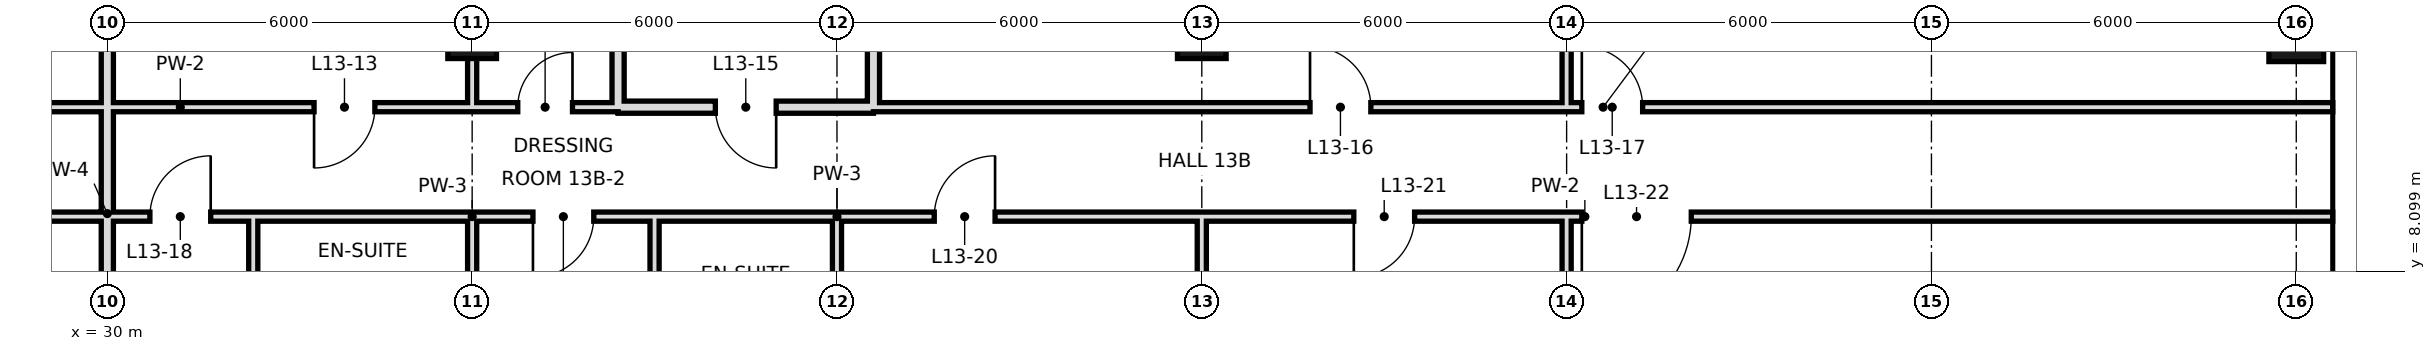
"""IFC4 building model, lengths in metres.
Left out: names, types, materials, properties, quantities, classifications, styles, units other than length and angle.
Written with IfcOpenShell. Run it as: python <this file> out.ifc"""

import sys

from ifc_helpers import new_model, si_unit, direction, frame, frame_2d, origin, origin_2d, place, context, subcontext, project, spatial, rectangle, hollow_rectangle, extrude, element, fill, save


model = new_model("IFC4")
c1 = context("Model", 3, precision=1e-05, world=origin(), true_north=direction((0.0, 1.0)))
c2 = subcontext(c1, "Body", "Model", "MODEL_VIEW")
j1 = project(units=[si_unit("LENGTHUNIT", "METRE"), si_unit("PLANEANGLEUNIT", "RADIAN")], contexts=[c1])
p1 = place(None, origin())
s1 = spatial("IfcSite", under=j1, at=p1, CompositionType="ELEMENT")
p2 = place(p1, origin())
s2 = spatial("IfcBuilding", under=s1, at=p2, CompositionType="ELEMENT")
p3 = place(p2, frame((0.0, 0.0, 67.8)))
s3 = spatial("IfcBuildingStorey", under=s2, at=p3, CompositionType="ELEMENT", Elevation=67.8)
for number, where, z_axis, x_axis in (
    (1, (36.0, 12.0, 0.0), (0.0, 0.0, 1.0), (1.0, 0.0, 0.0)),
    (2, (48.0, 12.0, 0.0), (0.0, 0.0, 1.0), (1.0, 0.0, 0.0)),
):
    element("IfcColumn", number, at=place(p3, frame(where, z_axis=z_axis, x_axis=x_axis)), inside=s3, PredefinedType="COLUMN", context=c2, shape_type="SweptSolid", body=[
        extrude(hollow_rectangle(XDim=0.8, YDim=0.8, WallThickness=0.04, at=origin_2d()), origin(), (0.0, 0.0, 1.0), 3.6),
    ])
p4 = place(p3, frame((66.0, 12.0, 0.0), z_axis=(0.0, 0.0, 1.0), x_axis=(1.0, 0.0, 0.0)))
e3 = element("IfcColumn", 3, at=p4, inside=s3, PredefinedType="COLUMN", context=c2, shape_type="SweptSolid", body=[
    extrude(hollow_rectangle(XDim=0.9, YDim=0.9, WallThickness=0.045, at=origin_2d()), origin(), (0.0, 0.0, 1.0), 3.6),
])
p5 = place(p3, frame((30.0, -0.6, 0.0), z_axis=(0.0, 0.0, 1.0), x_axis=(0.0, 1.0, 0.0)))
e4 = element("IfcWall", 4, at=p5, inside=s3, PredefinedType="SOLIDWALL", context=c2, shape_type="SweptSolid", body=[
    extrude(rectangle(XDim=19.3, YDim=0.2, at=frame_2d((9.65, 0.0))), origin(), (0.0, 0.0, 1.0), 2.72),
])
p6 = place(p3, frame((32.4, 6.0, 0.0), z_axis=(0.0, 0.0, 1.0), x_axis=(0.0, 1.0, 0.0)))
e5 = element("IfcWall", 5, at=p6, inside=s3, PredefinedType="PARTITIONING", context=c2, shape_type="SweptSolid", body=[
    extrude(rectangle(XDim=3.0, YDim=0.15, at=frame_2d((1.5, 0.0))), origin(), (0.0, 0.0, 1.0), 3.42),
])
p7 = place(p3, frame((36.0, 6.0, 0.0), z_axis=(0.0, 0.0, 1.0), x_axis=(0.0, 1.0, 0.0)))
e6 = element("IfcWall", 6, at=p7, inside=s3, PredefinedType="PARTITIONING", context=c2, shape_type="SweptSolid", body=[
    extrude(rectangle(XDim=3.0, YDim=0.15, at=frame_2d((1.5, 0.0))), origin(), (0.0, 0.0, 1.0), 2.72),
])
p8 = place(p3, frame((36.0, 10.8, 0.0), z_axis=(0.0, 0.0, 1.0), x_axis=(0.0, 1.0, 0.0)))
e7 = element("IfcWall", 7, at=p8, inside=s3, PredefinedType="PARTITIONING", context=c2, shape_type="SweptSolid", body=[
    extrude(rectangle(XDim=7.9, YDim=0.15, at=frame_2d((3.95, 0.0))), origin(), (0.0, 0.0, 1.0), 2.72),
])
p9 = place(p3, frame((38.4, 10.8, 0.0), z_axis=(0.0, 0.0, 1.0), x_axis=(0.0, 1.0, 0.0)))
e8 = element("IfcWall", 8, at=p9, inside=s3, PredefinedType="SOLIDWALL", context=c2, shape_type="SweptSolid", body=[
    extrude(rectangle(XDim=7.9, YDim=0.2, at=frame_2d((3.95, 0.0))), origin(), (0.0, 0.0, 1.0), 2.72),
])
p10 = place(p3, frame((39.0, 6.0, 0.0), z_axis=(0.0, 0.0, 1.0), x_axis=(0.0, 1.0, 0.0)))
e9 = element("IfcWall", 9, at=p10, inside=s3, PredefinedType="PARTITIONING", context=c2, shape_type="SweptSolid", body=[
    extrude(rectangle(XDim=3.0, YDim=0.15, at=frame_2d((1.5, 0.0))), origin(), (0.0, 0.0, 1.0), 3.42),
])
p11 = place(p3, frame((42.0, 6.0, 0.0), z_axis=(0.0, 0.0, 1.0), x_axis=(0.0, 1.0, 0.0)))
e10 = element("IfcWall", 10, at=p11, inside=s3, PredefinedType="PARTITIONING", context=c2, shape_type="SweptSolid", body=[
    extrude(rectangle(XDim=3.0, YDim=0.15, at=frame_2d((1.5, 0.0))), origin(), (0.0, 0.0, 1.0), 2.72),
])
p12 = place(p3, frame((42.6, 10.8, 0.0), z_axis=(0.0, 0.0, 1.0), x_axis=(0.0, 1.0, 0.0)))
e11 = element("IfcWall", 11, at=p12, inside=s3, PredefinedType="SOLIDWALL", context=c2, shape_type="SweptSolid", body=[
    extrude(rectangle(XDim=7.9, YDim=0.2, at=frame_2d((3.95, 0.0))), origin(), (0.0, 0.0, 1.0), 2.72),
])
p13 = place(p3, frame((48.0, 0.0, 0.0), z_axis=(0.0, 0.0, 1.0), x_axis=(0.0, 1.0, 0.0)))
e12 = element("IfcWall", 12, at=p13, inside=s3, PredefinedType="PARTITIONING", context=c2, shape_type="SweptSolid", body=[
    extrude(rectangle(XDim=9.0, YDim=0.15, at=frame_2d((4.5, 0.0))), origin(), (0.0, 0.0, 1.0), 2.72),
])
p14 = place(p3, frame((54.0, -0.6, 0.0), z_axis=(0.0, 0.0, 1.0), x_axis=(0.0, 1.0, 0.0)))
e13 = element("IfcWall", 13, at=p14, inside=s3, PredefinedType="PARTITIONING", context=c2, shape_type="SweptSolid", body=[
    extrude(rectangle(XDim=9.6, YDim=0.15, at=frame_2d((4.8, 0.0))), origin(), (0.0, 0.0, 1.0), 3.42),
])
p15 = place(p3, frame((54.0, 10.8, 0.0), z_axis=(0.0, 0.0, 1.0), x_axis=(0.0, 1.0, 0.0)))
e14 = element("IfcWall", 14, at=p15, inside=s3, PredefinedType="PARTITIONING", context=c2, shape_type="SweptSolid", body=[
    extrude(rectangle(XDim=7.2, YDim=0.15, at=frame_2d((3.6, 0.0))), origin(), (0.0, 0.0, 1.0), 3.42),
])
p16 = place(p3, frame((38.4, 10.8, 0.0), z_axis=(0.0, 0.0, 1.0), x_axis=(1.0, 0.0, 0.0)))
e15 = element("IfcWall", 15, at=p16, inside=s3, PredefinedType="SOLIDWALL", context=c2, shape_type="SweptSolid", body=[
    extrude(rectangle(XDim=4.2, YDim=0.2, at=frame_2d((2.1, 0.0))), origin(), (0.0, 0.0, 1.0), 2.72),
])
p17 = place(p16, frame((1.6, 0.0, 0.0)))
e16 = element("IfcOpeningElement", 16, at=p17, cuts=e15, PredefinedType="OPENING", context=c2, shape_type="SweptSolid", body=[
    extrude(rectangle(XDim=1.0, YDim=2.4, at=frame_2d((0.5, 1.2))), frame((0.0, 0.11, 0.0), z_axis=(0.0, -1.0, 0.0), x_axis=(1.0, 0.0, 0.0)), (0.0, 0.0, 1.0), 0.22),
])
p18 = place(p3, frame((26.4, 10.8, 0.0), z_axis=(0.0, 0.0, 1.0), x_axis=(1.0, 0.0, 0.0)))
e17 = element("IfcWall", 17, at=p18, inside=s3, PredefinedType="PARTITIONING", context=c2, shape_type="SweptSolid", body=[
    extrude(rectangle(XDim=9.6, YDim=0.15, at=frame_2d((4.8, 0.0))), origin(), (0.0, 0.0, 1.0), 3.42),
])
p19 = place(p18, frame((1.3, 0.0, 0.0)))
e18 = element("IfcOpeningElement", 18, at=p19, cuts=e17, PredefinedType="OPENING", context=c2, shape_type="SweptSolid", body=[
    extrude(rectangle(XDim=1.0, YDim=2.4, at=frame_2d((0.5, 1.2))), frame((0.0, 0.085, 0.0), z_axis=(0.0, -1.0, 0.0), x_axis=(1.0, 0.0, 0.0)), (0.0, 0.0, 1.0), 0.17),
])
p20 = place(p18, frame((7.0, 0.0, 0.0)))
e19 = element("IfcOpeningElement", 19, at=p20, cuts=e17, PredefinedType="OPENING", context=c2, shape_type="SweptSolid", body=[
    extrude(rectangle(XDim=1.0, YDim=2.4, at=frame_2d((0.5, 1.2))), frame((0.0, 0.085, 0.0), z_axis=(0.0, -1.0, 0.0), x_axis=(1.0, 0.0, 0.0)), (0.0, 0.0, 1.0), 0.17),
])
p21 = place(p3, frame((42.6, 10.8, 0.0), z_axis=(0.0, 0.0, 1.0), x_axis=(1.0, 0.0, 0.0)))
e20 = element("IfcWall", 20, at=p21, inside=s3, PredefinedType="PARTITIONING", context=c2, shape_type="SweptSolid", body=[
    extrude(rectangle(XDim=24.0, YDim=0.15, at=frame_2d((12.0, 0.0))), origin(), (0.0, 0.0, 1.0), 3.42),
])
p22 = place(p21, frame((7.18, 0.0, 0.0)))
e21 = element("IfcOpeningElement", 21, at=p22, cuts=e20, PredefinedType="OPENING", context=c2, shape_type="SweptSolid", body=[
    extrude(rectangle(XDim=1.0, YDim=2.4, at=frame_2d((0.5, 1.2))), frame((0.0, 0.085, 0.0), z_axis=(0.0, -1.0, 0.0), x_axis=(1.0, 0.0, 0.0)), (0.0, 0.0, 1.0), 0.17),
])
p23 = place(p21, frame((11.65, 0.0, 0.0)))
e22 = element("IfcOpeningElement", 22, at=p23, cuts=e20, PredefinedType="OPENING", context=c2, shape_type="SweptSolid", body=[
    extrude(rectangle(XDim=1.0, YDim=2.4, at=frame_2d((0.5, 1.2))), frame((0.0, 0.085, 0.0), z_axis=(0.0, -1.0, 0.0), x_axis=(1.0, 0.0, 0.0)), (0.0, 0.0, 1.0), 0.17),
])
p24 = place(p3, frame((36.0, 10.8, 0.0), z_axis=(0.0, 0.0, 1.0), x_axis=(1.0, 0.0, 0.0)))
e23 = element("IfcWall", 23, at=p24, inside=s3, PredefinedType="PARTITIONING", context=c2, shape_type="SweptSolid", body=[
    extrude(rectangle(XDim=2.4, YDim=0.15, at=frame_2d((1.2, 0.0))), origin(), (0.0, 0.0, 1.0), 3.42),
])
p25 = place(p24, frame((0.75, 0.0, 0.0)))
e24 = element("IfcOpeningElement", 24, at=p25, cuts=e23, PredefinedType="OPENING", context=c2, shape_type="SweptSolid", body=[
    extrude(rectangle(XDim=0.9, YDim=2.4, at=frame_2d((0.45, 1.2))), frame((0.0, 0.085, 0.0), z_axis=(0.0, -1.0, 0.0), x_axis=(1.0, 0.0, 0.0)), (0.0, 0.0, 1.0), 0.17),
])
p26 = place(p3, frame((30.0, 9.0, 0.0), z_axis=(0.0, 0.0, 1.0), x_axis=(1.0, 0.0, 0.0)))
e25 = element("IfcWall", 25, at=p26, inside=s3, PredefinedType="PARTITIONING", context=c2, shape_type="SweptSolid", body=[
    extrude(rectangle(XDim=2.4, YDim=0.15, at=frame_2d((1.2, 0.0))), origin(), (0.0, 0.0, 1.0), 3.42),
])
p27 = place(p26, frame((0.7, 0.0, 0.0)))
e26 = element("IfcOpeningElement", 26, at=p27, cuts=e25, PredefinedType="OPENING", context=c2, shape_type="SweptSolid", body=[
    extrude(rectangle(XDim=1.0, YDim=2.4, at=frame_2d((0.5, 1.2))), frame((0.0, 0.085, 0.0), z_axis=(0.0, -1.0, 0.0), x_axis=(1.0, 0.0, 0.0)), (0.0, 0.0, 1.0), 0.17),
])
p28 = place(p3, frame((36.0, 9.0, 0.0), z_axis=(0.0, 0.0, 1.0), x_axis=(1.0, 0.0, 0.0)))
e27 = element("IfcWall", 27, at=p28, inside=s3, PredefinedType="PARTITIONING", context=c2, shape_type="SweptSolid", body=[
    extrude(rectangle(XDim=3.0, YDim=0.15, at=frame_2d((1.5, 0.0))), origin(), (0.0, 0.0, 1.0), 3.42),
])
p29 = place(p28, frame((1.0, 0.0, 0.0)))
e28 = element("IfcOpeningElement", 28, at=p29, cuts=e27, PredefinedType="OPENING", context=c2, shape_type="SweptSolid", body=[
    extrude(rectangle(XDim=1.0, YDim=2.4, at=frame_2d((0.5, 1.2))), frame((0.0, 0.085, 0.0), z_axis=(0.0, -1.0, 0.0), x_axis=(1.0, 0.0, 0.0)), (0.0, 0.0, 1.0), 0.17),
])
p30 = place(p3, frame((42.0, 9.0, 0.0), z_axis=(0.0, 0.0, 1.0), x_axis=(1.0, 0.0, 0.0)))
e29 = element("IfcWall", 29, at=p30, inside=s3, PredefinedType="PARTITIONING", context=c2, shape_type="SweptSolid", body=[
    extrude(rectangle(XDim=24.6, YDim=0.15, at=frame_2d((12.3, 0.0))), origin(), (0.0, 0.0, 1.0), 3.42),
])
p31 = place(p30, frame((1.6, 0.0, 0.0)))
e30 = element("IfcOpeningElement", 30, at=p31, cuts=e29, PredefinedType="OPENING", context=c2, shape_type="SweptSolid", body=[
    extrude(rectangle(XDim=1.0, YDim=2.4, at=frame_2d((0.5, 1.2))), frame((0.0, 0.085, 0.0), z_axis=(0.0, -1.0, 0.0), x_axis=(1.0, 0.0, 0.0)), (0.0, 0.0, 1.0), 0.17),
])
p32 = place(p30, frame((8.5, 0.0, 0.0)))
e31 = element("IfcOpeningElement", 31, at=p32, cuts=e29, PredefinedType="OPENING", context=c2, shape_type="SweptSolid", body=[
    extrude(rectangle(XDim=1.0, YDim=2.4, at=frame_2d((0.5, 1.2))), frame((0.0, 0.085, 0.0), z_axis=(0.0, -1.0, 0.0), x_axis=(1.0, 0.0, 0.0)), (0.0, 0.0, 1.0), 0.17),
])
p33 = place(p30, frame((12.25, 0.0, 0.0)))
e32 = element("IfcOpeningElement", 32, at=p33, cuts=e29, PredefinedType="OPENING", context=c2, shape_type="SweptSolid", body=[
    extrude(rectangle(XDim=1.8, YDim=2.4, at=frame_2d((0.9, 1.2))), frame((0.0, 0.085, 0.0), z_axis=(0.0, -1.0, 0.0), x_axis=(1.0, 0.0, 0.0)), (0.0, 0.0, 1.0), 0.17),
])
for number, where, z_axis, x_axis in (
    (33, (26.4, 9.0, 0.0), (0.0, 0.0, 1.0), (1.0, 0.0, 0.0)),
    (34, (32.4, 9.0, 0.0), (0.0, 0.0, 1.0), (1.0, 0.0, 0.0)),
):
    element("IfcWall", number, at=place(p3, frame(where, z_axis=z_axis, x_axis=x_axis)), inside=s3, PredefinedType="PARTITIONING", context=c2, shape_type="SweptSolid", body=[
        extrude(rectangle(XDim=3.6, YDim=0.15, at=frame_2d((1.8, 0.0))), origin(), (0.0, 0.0, 1.0), 3.42),
    ])
p34 = place(p3, frame((39.0, 9.0, 0.0), z_axis=(0.0, 0.0, 1.0), x_axis=(1.0, 0.0, 0.0)))
e35 = element("IfcWall", 35, at=p34, inside=s3, PredefinedType="PARTITIONING", context=c2, shape_type="SweptSolid", body=[
    extrude(rectangle(XDim=3.0, YDim=0.15, at=frame_2d((1.5, 0.0))), origin(), (0.0, 0.0, 1.0), 3.42),
])
p35 = place(p20, frame((1.0, 0.0, 0.0), z_axis=(0.0, 0.0, 1.0), x_axis=(-1.0, 0.0, 0.0)))
e36 = element("IfcDoor", 36, at=p35, inside=s3, OperationType="SINGLE_SWING_RIGHT", PredefinedType="DOOR", context=c2, shape_type="SweptSolid", body=[
    extrude(rectangle(XDim=1.0, YDim=2.4, at=frame_2d((0.5, 1.2))), frame((0.0, 0.025, 0.0), z_axis=(0.0, -1.0, 0.0), x_axis=(1.0, 0.0, 0.0)), (0.0, 0.0, 1.0), 0.05),
])
fill(e19, e36)
p36 = place(p25, frame((0.9, 0.0, 0.0), z_axis=(0.0, 0.0, 1.0), x_axis=(-1.0, 0.0, 0.0)))
e37 = element("IfcDoor", 37, at=p36, inside=s3, OperationType="SINGLE_SWING_LEFT", PredefinedType="DOOR", context=c2, shape_type="SweptSolid", body=[
    extrude(rectangle(XDim=0.9, YDim=2.4, at=frame_2d((0.45, 1.2))), frame((0.0, 0.025, 0.0), z_axis=(0.0, -1.0, 0.0), x_axis=(1.0, 0.0, 0.0)), (0.0, 0.0, 1.0), 0.05),
])
fill(e24, e37)
p37 = place(p17, origin())
e38 = element("IfcDoor", 38, at=p37, inside=s3, OperationType="SINGLE_SWING_RIGHT", PredefinedType="DOOR", context=c2, shape_type="SweptSolid", body=[
    extrude(rectangle(XDim=1.0, YDim=2.4, at=frame_2d((0.5, 1.2))), frame((0.0, 0.025, 0.0), z_axis=(0.0, -1.0, 0.0), x_axis=(1.0, 0.0, 0.0)), (0.0, 0.0, 1.0), 0.05),
])
fill(e16, e38)
p38 = place(p22, origin())
e39 = element("IfcDoor", 39, at=p38, inside=s3, OperationType="SINGLE_SWING_LEFT", PredefinedType="DOOR", context=c2, shape_type="SweptSolid", body=[
    extrude(rectangle(XDim=1.0, YDim=2.4, at=frame_2d((0.5, 1.2))), frame((0.0, 0.025, 0.0), z_axis=(0.0, -1.0, 0.0), x_axis=(1.0, 0.0, 0.0)), (0.0, 0.0, 1.0), 0.05),
])
fill(e21, e39)
p39 = place(p23, origin())
e40 = element("IfcDoor", 40, at=p39, inside=s3, OperationType="SINGLE_SWING_LEFT", PredefinedType="DOOR", context=c2, shape_type="SweptSolid", body=[
    extrude(rectangle(XDim=1.0, YDim=2.4, at=frame_2d((0.5, 1.2))), frame((0.0, 0.025, 0.0), z_axis=(0.0, -1.0, 0.0), x_axis=(1.0, 0.0, 0.0)), (0.0, 0.0, 1.0), 0.05),
])
fill(e22, e40)
p40 = place(p27, frame((1.0, 0.0, 0.0), z_axis=(0.0, 0.0, 1.0), x_axis=(-1.0, 0.0, 0.0)))
e41 = element("IfcDoor", 41, at=p40, inside=s3, OperationType="SINGLE_SWING_LEFT", PredefinedType="DOOR", context=c2, shape_type="SweptSolid", body=[
    extrude(rectangle(XDim=1.0, YDim=2.4, at=frame_2d((0.5, 1.2))), frame((0.0, 0.025, 0.0), z_axis=(0.0, -1.0, 0.0), x_axis=(1.0, 0.0, 0.0)), (0.0, 0.0, 1.0), 0.05),
])
fill(e26, e41)
p41 = place(p29, frame((1.0, 0.0, 0.0), z_axis=(0.0, 0.0, 1.0), x_axis=(-1.0, 0.0, 0.0)))
e42 = element("IfcDoor", 42, at=p41, inside=s3, OperationType="SINGLE_SWING_RIGHT", PredefinedType="DOOR", context=c2, shape_type="SweptSolid", body=[
    extrude(rectangle(XDim=1.0, YDim=2.4, at=frame_2d((0.5, 1.2))), frame((0.0, 0.025, 0.0), z_axis=(0.0, -1.0, 0.0), x_axis=(1.0, 0.0, 0.0)), (0.0, 0.0, 1.0), 0.05),
])
fill(e28, e42)
p42 = place(p31, frame((1.0, 0.0, 0.0), z_axis=(0.0, 0.0, 1.0), x_axis=(-1.0, 0.0, 0.0)))
e43 = element("IfcDoor", 43, at=p42, inside=s3, OperationType="SINGLE_SWING_LEFT", PredefinedType="DOOR", context=c2, shape_type="SweptSolid", body=[
    extrude(rectangle(XDim=1.0, YDim=2.4, at=frame_2d((0.5, 1.2))), frame((0.0, 0.025, 0.0), z_axis=(0.0, -1.0, 0.0), x_axis=(1.0, 0.0, 0.0)), (0.0, 0.0, 1.0), 0.05),
])
fill(e30, e43)
p43 = place(p32, frame((1.0, 0.0, 0.0), z_axis=(0.0, 0.0, 1.0), x_axis=(-1.0, 0.0, 0.0)))
e44 = element("IfcDoor", 44, at=p43, inside=s3, OperationType="SINGLE_SWING_RIGHT", PredefinedType="DOOR", context=c2, shape_type="SweptSolid", body=[
    extrude(rectangle(XDim=1.0, YDim=2.4, at=frame_2d((0.5, 1.2))), frame((0.0, 0.025, 0.0), z_axis=(0.0, -1.0, 0.0), x_axis=(1.0, 0.0, 0.0)), (0.0, 0.0, 1.0), 0.05),
])
fill(e31, e44)
p44 = place(p33, frame((1.8, 0.0, 0.0), z_axis=(0.0, 0.0, 1.0), x_axis=(-1.0, 0.0, 0.0)))
e45 = element("IfcDoor", 45, at=p44, inside=s3, OperationType="SINGLE_SWING_RIGHT", PredefinedType="DOOR", context=c2, shape_type="SweptSolid", body=[
    extrude(rectangle(XDim=1.8, YDim=2.4, at=frame_2d((0.9, 1.2))), frame((0.0, 0.025, 0.0), z_axis=(0.0, -1.0, 0.0), x_axis=(1.0, 0.0, 0.0)), (0.0, 0.0, 1.0), 0.05),
])
fill(e32, e45)
save(model, sys.argv[1])
